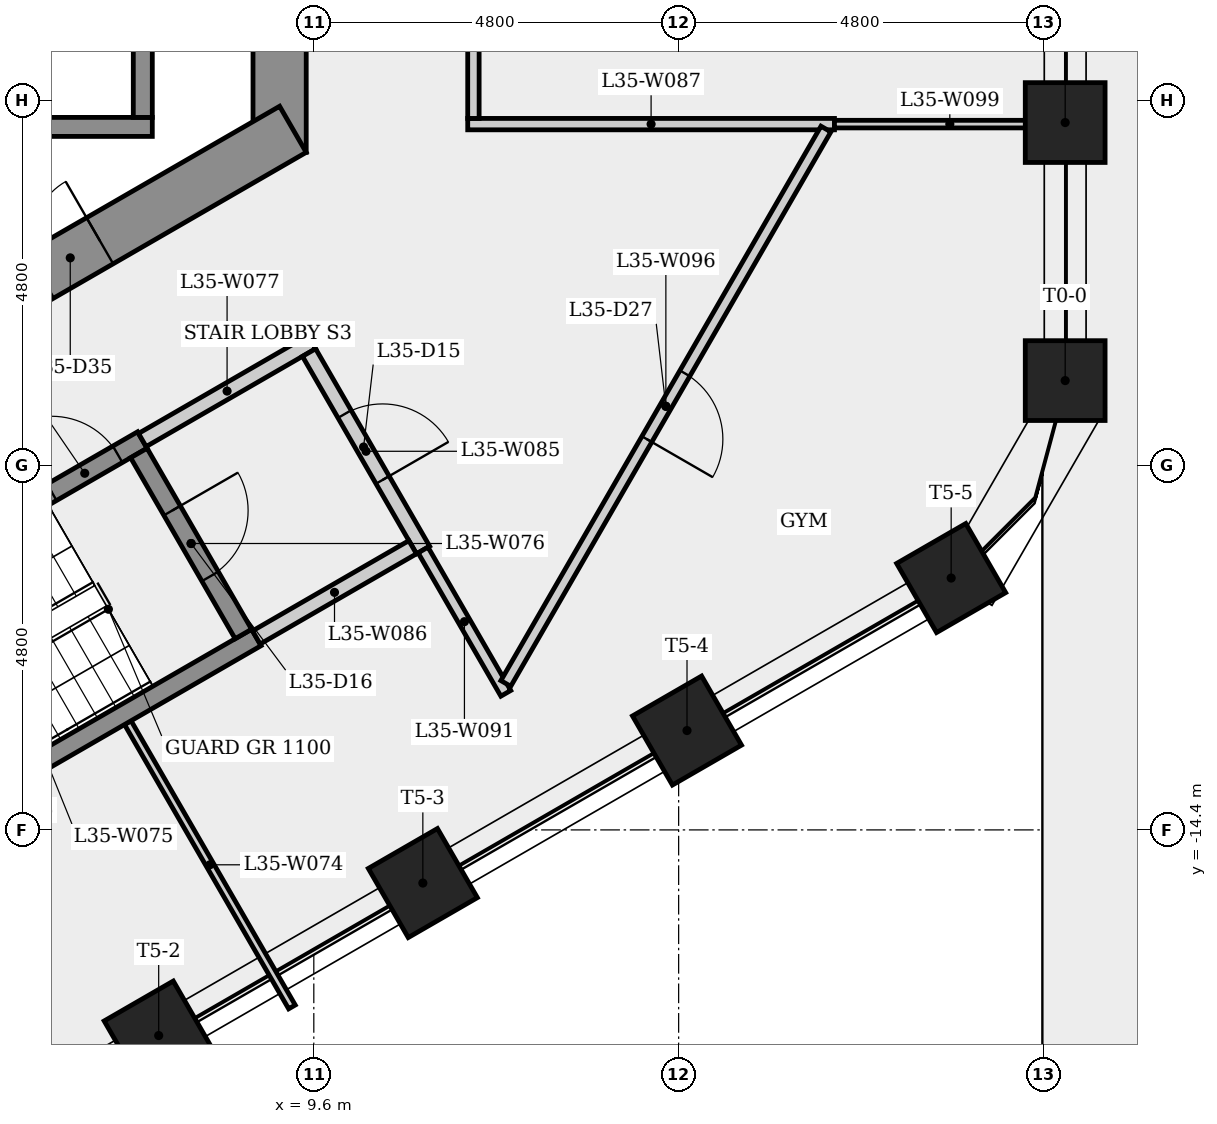
"""IFC4 building model, lengths in metres.
Left out: names, types, materials, properties, quantities, classifications, styles, units other than length and angle.
Written with IfcOpenShell. Run it as: python <this file> out.ifc"""

import sys

from ifc_helpers import new_model, si_unit, direction, frame, frame_2d, origin, origin_2d, place, context, subcontext, project, spatial, rectangle, extrude, element, fill, save


model = new_model("IFC4")
c1 = context("Model", 3, precision=1e-05, world=origin(), true_north=direction((0.0, 1.0)))
c2 = subcontext(c1, "Body", "Model", "MODEL_VIEW")
j1 = project(units=[si_unit("LENGTHUNIT", "METRE"), si_unit("PLANEANGLEUNIT", "RADIAN")], contexts=[c1])
p1 = place(None, origin())
s1 = spatial("IfcSite", under=j1, at=p1, CompositionType="ELEMENT")
p2 = place(p1, origin())
s2 = spatial("IfcBuilding", under=s1, at=p2, CompositionType="ELEMENT")
p3 = place(p2, frame((0.0, 0.0, 132.5)))
s3 = spatial("IfcBuildingStorey", under=s2, at=p3, CompositionType="ELEMENT", Elevation=132.5)
p4 = place(p3, frame((9.15, -5.485, 0.0), z_axis=(0.0, 0.0, 1.0), x_axis=(0.0, 1.0, 0.0)))
e1 = element("IfcWall", 1, at=p4, inside=s3, PredefinedType="SHEAR", context=c2, shape_type="SweptSolid", body=[
    extrude(rectangle(XDim=10.97, YDim=0.7, at=frame_2d((5.485, 0.0))), origin(), (0.0, 0.0, 1.0), 3.4),
])
p5 = place(p4, frame((4.685, 0.0, 0.0)))
e2 = element("IfcOpeningElement", 2, at=p5, cuts=e1, PredefinedType="OPENING", context=c2, shape_type="SweptSolid", body=[
    extrude(rectangle(XDim=1.6, YDim=2.1, at=frame_2d((0.8, 1.05))), frame((0.0, 0.36, 0.0), z_axis=(0.0, -1.0, 0.0), x_axis=(1.0, 0.0, 0.0)), (0.0, 0.0, 1.0), 0.72),
])
p6 = place(p3, frame((-0.175, -10.667, 0.0), z_axis=(0.0, 0.0, 1.0), x_axis=(0.866023993627, 0.500002442456, 0.0)))
e3 = element("IfcWall", 3, at=p6, inside=s3, PredefinedType="SHEAR", context=c2, shape_type="SweptSolid", body=[
    extrude(rectangle(XDim=10.97, YDim=0.7, at=frame_2d((5.485, 0.0))), origin(), (0.0, 0.0, 1.0), 3.4),
])
p7 = place(p6, frame((7.137, 0.0, 0.0)))
e4 = element("IfcOpeningElement", 4, at=p7, cuts=e3, PredefinedType="OPENING", context=c2, shape_type="SweptSolid", body=[
    extrude(rectangle(XDim=0.9, YDim=2.1, at=frame_2d((0.45, 1.05))), frame((0.0, 0.36, 0.0), z_axis=(0.0, -1.0, 0.0), x_axis=(1.0, 0.0, 0.0)), (0.0, 0.0, 1.0), 0.72),
])
for number, where, z_axis, x_axis in (
    (5, (19.486, -8.488, 0.0), (0.0, 0.0, 1.0), (1.0, 0.0, 0.0)),
    (6, (19.486, -5.093, 0.0), (0.0, 0.0, 1.0), (1.0, 0.0, 0.0)),
    (7, (7.559, -17.106, 0.0), (0.0, 0.0, 1.0), (0.5, -0.866, 0.0)),
    (8, (11.035, -15.099, 0.0), (0.0, 0.0, 1.0), (0.5, -0.866, 0.0)),
    (9, (14.51, -13.093, 0.0), (0.0, 0.0, 1.0), (0.5, -0.866, 0.0)),
    (10, (17.986, -11.086, 0.0), (0.0, 0.0, 1.0), (0.5, -0.866, 0.0)),
):
    element("IfcColumn", number, at=place(p3, frame(where, z_axis=z_axis, x_axis=x_axis)), inside=s3, PredefinedType="COLUMN", context=c2, shape_type="SweptSolid", body=[
        extrude(rectangle(XDim=1.05, YDim=1.05, at=origin_2d()), origin(), (0.0, 0.0, 1.0), 3.4),
    ])
p8 = place(p3, frame((-7.225, -5.15, 0.0), z_axis=(0.0, 0.0, 1.0), x_axis=(1.0, 0.0, 0.0)))
e11 = element("IfcWall", 11, at=p8, inside=s3, PredefinedType="SHEAR", context=c2, shape_type="SweptSolid", body=[
    extrude(rectangle(XDim=14.7, YDim=0.25, at=frame_2d((7.35, 0.0))), origin(), (0.0, 0.0, 1.0), 3.0),
])
p9 = place(p3, frame((1.585, -12.595, 0.0), z_axis=(0.0, 0.0, 1.0), x_axis=(0.866036417653, 0.499980922934, 0.0)))
e12 = element("IfcWall", 12, at=p9, inside=s3, PredefinedType="SHEAR", context=c2, shape_type="SweptSolid", body=[
    extrude(rectangle(XDim=6.65, YDim=0.25, at=frame_2d((3.325, 0.0))), origin(), (0.0, 0.0, 1.0), 3.0),
])
p10 = place(p9, frame((5.275, 0.0, 0.0)))
e13 = element("IfcOpeningElement", 13, at=p10, cuts=e12, PredefinedType="OPENING", context=c2, shape_type="SweptSolid", body=[
    extrude(rectangle(XDim=1.0, YDim=2.1, at=frame_2d((0.5, 1.05))), frame((0.0, 0.135, 0.0), z_axis=(0.0, -1.0, 0.0), x_axis=(1.0, 0.0, 0.0)), (0.0, 0.0, 1.0), 0.27),
])
p11 = place(p3, frame((7.153, -12.989, 0.0), z_axis=(0.0, 0.0, 1.0), x_axis=(0.499993182398, -0.866029339893, 0.0)))
e14 = element("IfcWall", 14, at=p11, inside=s3, PredefinedType="PARTITIONING", context=c2, shape_type="SweptSolid", body=[
    extrude(rectangle(XDim=4.319, YDim=0.1, at=frame_2d((2.16, 0.0))), origin(), (0.0, 0.0, 1.0), 3.0),
])
p12 = place(p3, frame((3.301, -15.068, 0.0), z_axis=(0.0, 0.0, 1.0), x_axis=(0.866035036182, 0.499983315828, 0.0)))
e15 = element("IfcWall", 15, at=p12, inside=s3, PredefinedType="SHEAR", context=c2, shape_type="SweptSolid", body=[
    extrude(rectangle(XDim=6.4, YDim=0.25, at=frame_2d((3.2, 0.0))), origin(), (0.0, 0.0, 1.0), 3.0),
])
p13 = place(p3, frame((7.298, -9.441, 0.0), z_axis=(0.0, 0.0, 1.0), x_axis=(0.500034990121, -0.866005201286, 0.0)))
e16 = element("IfcWall", 16, at=p13, inside=s3, PredefinedType="SHEAR", context=c2, shape_type="SweptSolid", body=[
    extrude(rectangle(XDim=2.75, YDim=0.25, at=frame_2d((1.375, 0.0))), origin(), (0.0, 0.0, 1.0), 3.0),
])
p14 = place(p13, frame((0.875, 0.0, 0.0)))
e17 = element("IfcOpeningElement", 17, at=p14, cuts=e16, PredefinedType="OPENING", context=c2, shape_type="SweptSolid", body=[
    extrude(rectangle(XDim=1.0, YDim=2.1, at=frame_2d((0.5, 1.05))), frame((0.0, 0.135, 0.0), z_axis=(0.0, -1.0, 0.0), x_axis=(1.0, 0.0, 0.0)), (0.0, 0.0, 1.0), 0.27),
])
p15 = place(p3, frame((7.344, -9.27, 0.0), z_axis=(0.0, 0.0, 1.0), x_axis=(0.866005588531, 0.500034319456, 0.0)))
e18 = element("IfcWall", 18, at=p15, inside=s3, PredefinedType="PARTITIONING", context=c2, shape_type="SweptSolid", body=[
    extrude(rectangle(XDim=2.575, YDim=0.2, at=frame_2d((1.288, 0.0))), origin(), (0.0, 0.0, 1.0), 3.0),
])
p16 = place(p3, frame((7.35, -1.925, 0.0), z_axis=(0.0, 0.0, 1.0), x_axis=(0.0, -1.0, 0.0)))
e19 = element("IfcWall", 19, at=p16, inside=s3, PredefinedType="SHEAR", context=c2, shape_type="SweptSolid", body=[
    extrude(rectangle(XDim=3.1, YDim=0.25, at=frame_2d((1.55, 0.0))), origin(), (0.0, 0.0, 1.0), 3.4),
])
p17 = place(p3, frame((9.537, -8.119, 0.0), z_axis=(0.0, 0.0, 1.0), x_axis=(0.499990139034, -0.866031096941, 0.0)))
e20 = element("IfcWall", 20, at=p17, inside=s3, PredefinedType="PARTITIONING", context=c2, shape_type="SweptSolid", body=[
    extrude(rectangle(XDim=3.0, YDim=0.2, at=frame_2d((1.5, 0.0))), origin(), (0.0, 0.0, 1.0), 3.0),
])
p18 = place(p17, frame((0.935, 0.0, 0.0)))
e21 = element("IfcOpeningElement", 21, at=p18, cuts=e20, PredefinedType="OPENING", context=c2, shape_type="SweptSolid", body=[
    extrude(rectangle(XDim=1.0, YDim=2.1, at=frame_2d((0.5, 1.05))), frame((0.0, 0.11, 0.0), z_axis=(0.0, -1.0, 0.0), x_axis=(1.0, 0.0, 0.0)), (0.0, 0.0, 1.0), 0.22),
])
p19 = place(p3, frame((10.901, -10.681, 0.0), z_axis=(0.0, 0.0, 1.0), x_axis=(-0.866007538022, -0.500030943131, 0.0)))
e22 = element("IfcWall", 22, at=p19, inside=s3, PredefinedType="PARTITIONING", context=c2, shape_type="SweptSolid", body=[
    extrude(rectangle(XDim=2.375, YDim=0.2, at=frame_2d((1.188, 0.0))), origin(), (0.0, 0.0, 1.0), 3.0),
])
p20 = place(p3, frame((11.625, -5.113, 0.0), z_axis=(0.0, 0.0, 1.0), x_axis=(1.0, 0.0, 0.0)))
e23 = element("IfcWall", 23, at=p20, inside=s3, PredefinedType="PARTITIONING", context=c2, shape_type="SweptSolid", body=[
    extrude(rectangle(XDim=4.825, YDim=0.15, at=frame_2d((2.413, 0.0))), origin(), (0.0, 0.0, 1.0), 3.0),
])
p21 = place(p3, frame((11.7, -5.038, 0.0), z_axis=(0.0, 0.0, 1.0), x_axis=(0.0, 1.0, 0.0)))
e24 = element("IfcWall", 24, at=p21, inside=s3, PredefinedType="PARTITIONING", context=c2, shape_type="SweptSolid", body=[
    extrude(rectangle(XDim=10.227, YDim=0.15, at=frame_2d((5.113, 0.0))), origin(), (0.0, 0.0, 1.0), 3.0),
])
p22 = place(p21, frame((2.856, 0.0, 0.0)))
e25 = element("IfcOpeningElement", 25, at=p22, cuts=e24, PredefinedType="OPENING", context=c2, shape_type="SweptSolid", body=[
    extrude(rectangle(XDim=1.0, YDim=2.1, at=frame_2d((0.5, 1.05))), frame((0.0, 0.085, 0.0), z_axis=(0.0, -1.0, 0.0), x_axis=(1.0, 0.0, 0.0)), (0.0, 0.0, 1.0), 0.17),
])
p23 = place(p3, frame((12.126, -12.603, 0.0), z_axis=(0.0, 0.0, 1.0), x_axis=(-0.499997407846, 0.86602690036, 0.0)))
e26 = element("IfcWall", 26, at=p23, inside=s3, PredefinedType="PARTITIONING", context=c2, shape_type="SweptSolid", body=[
    extrude(rectangle(XDim=2.178, YDim=0.15, at=frame_2d((1.089, 0.0))), origin(), (0.0, 0.0, 1.0), 3.0),
])
p24 = place(p3, frame((16.338, -5.178, 0.0), z_axis=(0.0, 0.0, 1.0), x_axis=(-0.499973348067, -0.866040790738, 0.0)))
e27 = element("IfcWall", 27, at=p24, inside=s3, PredefinedType="PARTITIONING", context=c2, shape_type="SweptSolid", body=[
    extrude(rectangle(XDim=8.423, YDim=0.15, at=frame_2d((4.212, 0.0))), origin(), (0.0, 0.0, 1.0), 3.0),
])
p25 = place(p24, frame((3.712, 0.0, 0.0)))
e28 = element("IfcOpeningElement", 28, at=p25, cuts=e27, PredefinedType="OPENING", context=c2, shape_type="SweptSolid", body=[
    extrude(rectangle(XDim=1.0, YDim=2.1, at=frame_2d((0.5, 1.05))), frame((0.0, 0.085, 0.0), z_axis=(0.0, -1.0, 0.0), x_axis=(1.0, 0.0, 0.0)), (0.0, 0.0, 1.0), 0.17),
])
p26 = place(p3, frame((19.486, -5.113, 0.0), z_axis=(0.0, 0.0, 1.0), x_axis=(-1.0, 0.0, 0.0)))
e29 = element("IfcWall", 29, at=p26, inside=s3, PredefinedType="PARTITIONING", context=c2, shape_type="SweptSolid", body=[
    extrude(rectangle(XDim=3.035, YDim=0.1, at=frame_2d((1.518, 0.0))), origin(), (0.0, 0.0, 1.0), 3.0),
])
p27 = place(p10, origin())
e30 = element("IfcDoor", 30, at=p27, inside=s3, OperationType="SINGLE_SWING_LEFT", PredefinedType="DOOR", context=c2, shape_type="SweptSolid", body=[
    extrude(rectangle(XDim=1.0, YDim=2.1, at=frame_2d((0.5, 1.05))), frame((0.0, 0.025, 0.0), z_axis=(0.0, -1.0, 0.0), x_axis=(1.0, 0.0, 0.0)), (0.0, 0.0, 1.0), 0.05),
])
fill(e13, e30)
p28 = place(p18, origin())
e31 = element("IfcDoor", 31, at=p28, inside=s3, OperationType="SINGLE_SWING_RIGHT", PredefinedType="DOOR", context=c2, shape_type="SweptSolid", body=[
    extrude(rectangle(XDim=1.0, YDim=2.1, at=frame_2d((0.5, 1.05))), frame((0.0, 0.025, 0.0), z_axis=(0.0, -1.0, 0.0), x_axis=(1.0, 0.0, 0.0)), (0.0, 0.0, 1.0), 0.05),
])
fill(e21, e31)
p29 = place(p14, origin())
e32 = element("IfcDoor", 32, at=p29, inside=s3, OperationType="SINGLE_SWING_LEFT", PredefinedType="DOOR", context=c2, shape_type="SweptSolid", body=[
    extrude(rectangle(XDim=1.0, YDim=2.1, at=frame_2d((0.5, 1.05))), frame((0.0, 0.025, 0.0), z_axis=(0.0, -1.0, 0.0), x_axis=(1.0, 0.0, 0.0)), (0.0, 0.0, 1.0), 0.05),
])
fill(e17, e32)
p30 = place(p25, origin())
e33 = element("IfcDoor", 33, at=p30, inside=s3, OperationType="SINGLE_SWING_RIGHT", PredefinedType="DOOR", context=c2, shape_type="SweptSolid", body=[
    extrude(rectangle(XDim=1.0, YDim=2.1, at=frame_2d((0.5, 1.05))), frame((0.0, 0.025, 0.0), z_axis=(0.0, -1.0, 0.0), x_axis=(1.0, 0.0, 0.0)), (0.0, 0.0, 1.0), 0.05),
])
fill(e28, e33)
p31 = place(p7, origin())
e34 = element("IfcDoor", 34, at=p31, inside=s3, OperationType="SINGLE_SWING_RIGHT", PredefinedType="DOOR", context=c2, shape_type="SweptSolid", body=[
    extrude(rectangle(XDim=0.9, YDim=2.1, at=frame_2d((0.45, 1.05))), frame((0.0, 0.025, 0.0), z_axis=(0.0, -1.0, 0.0), x_axis=(1.0, 0.0, 0.0)), (0.0, 0.0, 1.0), 0.05),
])
fill(e4, e34)
save(model, sys.argv[1])
